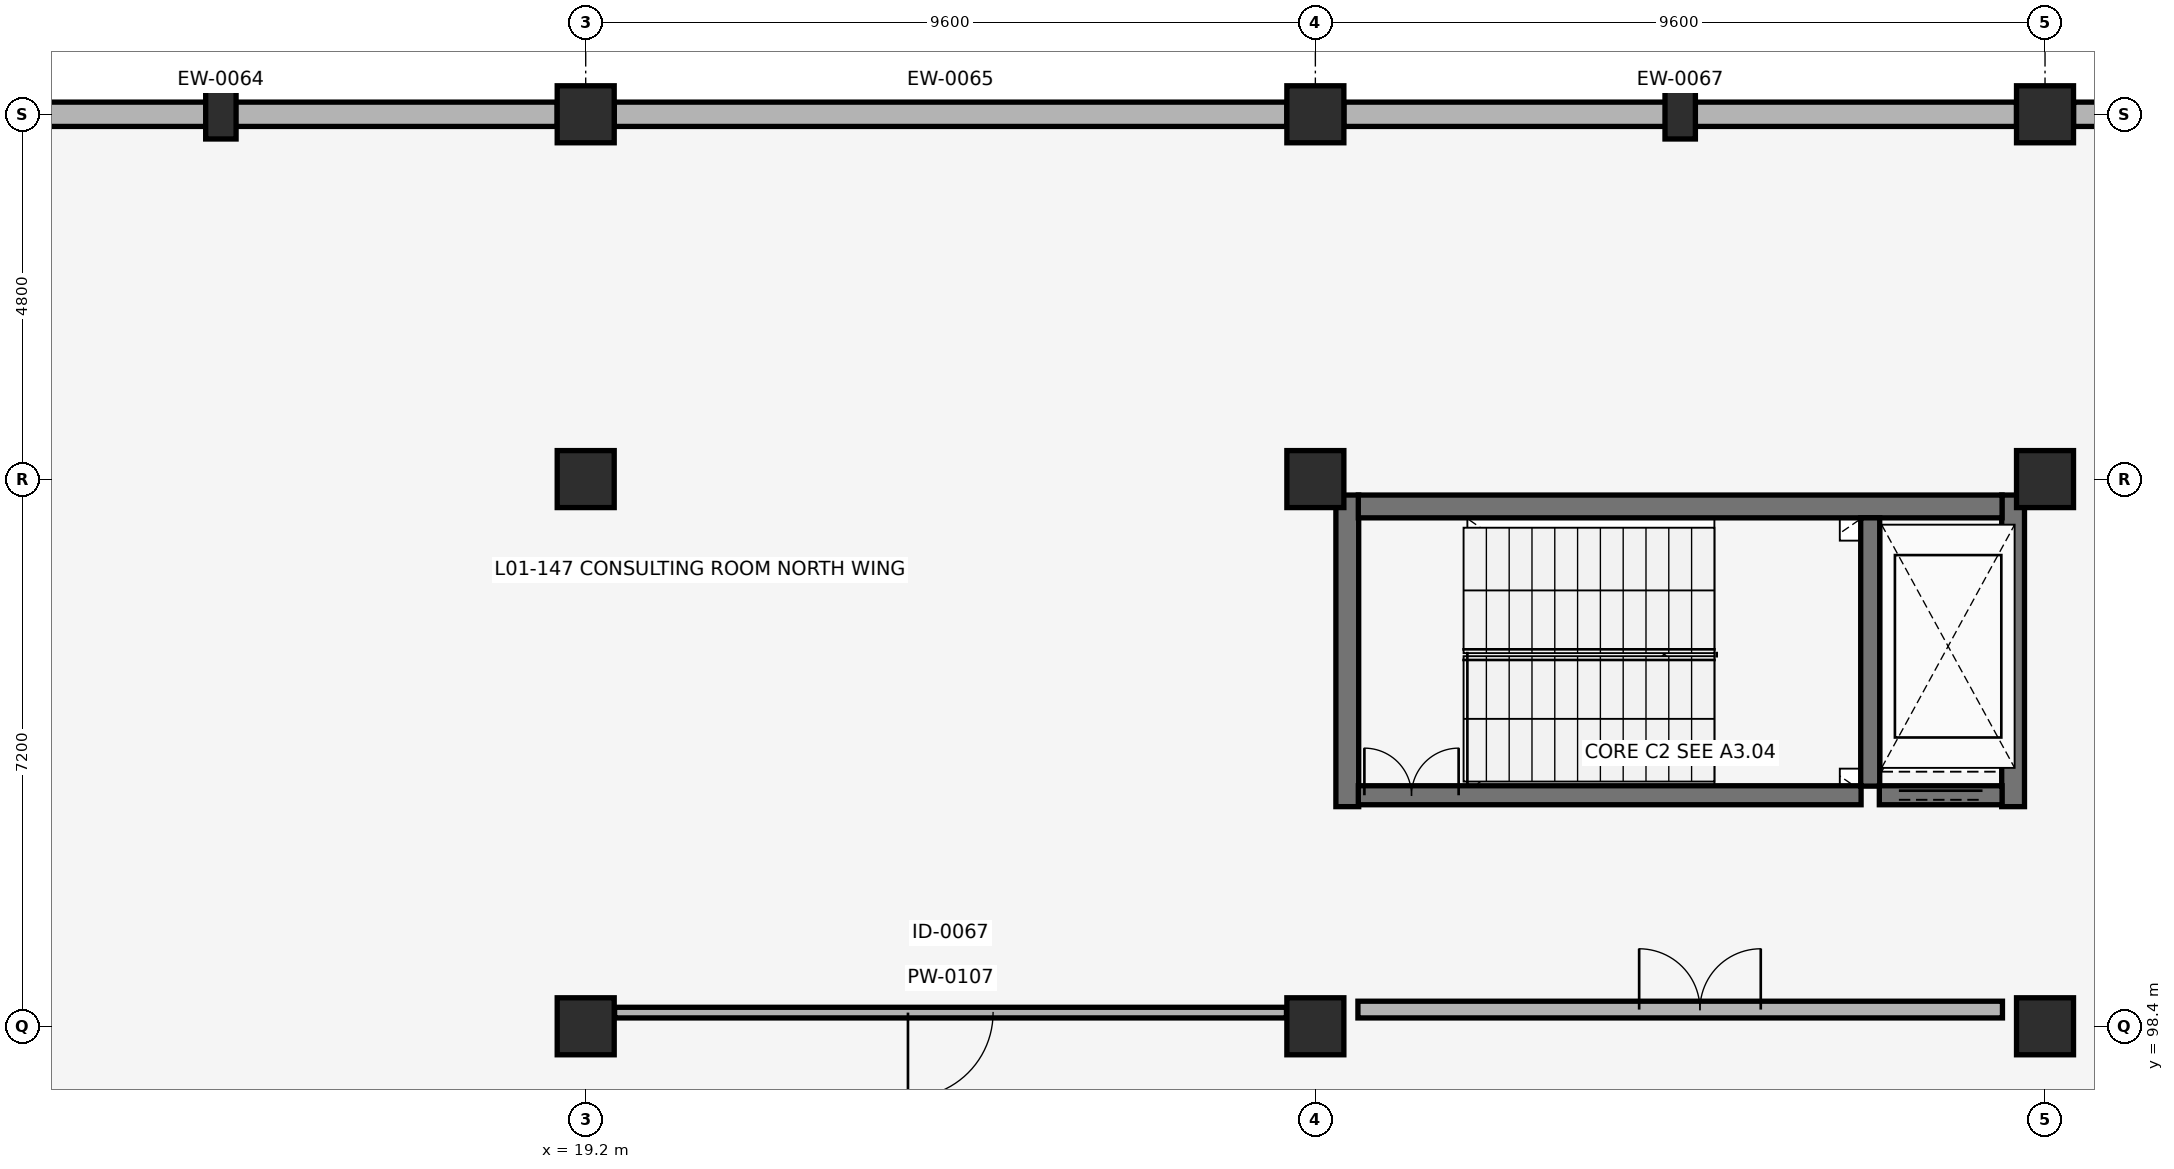
"""IFC4 building model, lengths in metres.
Left out: names, types, materials, properties, quantities, classifications, styles, units other than length and angle.
Written with IfcOpenShell. Run it as: python <this file> out.ifc"""

import sys

from ifc_helpers import new_model, si_unit, direction, frame, frame_2d, origin, origin_2d, place, context, subcontext, project, spatial, rectangle, extrude, element, fill, save


model = new_model("IFC4")
c1 = context("Model", 3, precision=1e-05, world=origin(), true_north=direction((0.0, 1.0)))
c2 = subcontext(c1, "Body", "Model", "MODEL_VIEW")
j1 = project(units=[si_unit("LENGTHUNIT", "METRE"), si_unit("PLANEANGLEUNIT", "RADIAN")], contexts=[c1])
p1 = place(None, origin())
s1 = spatial("IfcSite", under=j1, at=p1, CompositionType="ELEMENT")
p2 = place(p1, origin())
s2 = spatial("IfcBuilding", under=s1, at=p2, CompositionType="ELEMENT")
p3 = place(p2, frame((0.0, 0.0, 4.42)))
s3 = spatial("IfcBuildingStorey", under=s2, at=p3, CompositionType="ELEMENT", Elevation=4.42)
for number, where, z_axis, x_axis in (
    (1, (19.2, 98.4, 0.0), (0.0, 0.0, 1.0), (1.0, 0.0, 0.0)),
    (2, (19.2, 105.6, 0.0), (0.0, 0.0, 1.0), (1.0, 0.0, 0.0)),
    (3, (19.2, 110.4, 0.0), (0.0, 0.0, 1.0), (1.0, 0.0, 0.0)),
    (4, (28.8, 98.4, 0.0), (0.0, 0.0, 1.0), (1.0, 0.0, 0.0)),
    (5, (28.8, 105.6, 0.0), (0.0, 0.0, 1.0), (1.0, 0.0, 0.0)),
    (6, (28.8, 110.4, 0.0), (0.0, 0.0, 1.0), (1.0, 0.0, 0.0)),
    (7, (38.4, 98.4, 0.0), (0.0, 0.0, 1.0), (1.0, 0.0, 0.0)),
    (8, (38.4, 105.6, 0.0), (0.0, 0.0, 1.0), (1.0, 0.0, 0.0)),
    (9, (38.4, 110.4, 0.0), (0.0, 0.0, 1.0), (1.0, 0.0, 0.0)),
):
    element("IfcColumn", number, at=place(p3, frame(where, z_axis=z_axis, x_axis=x_axis)), inside=s3, PredefinedType="COLUMN", context=c2, shape_type="SweptSolid", body=[
        extrude(rectangle(XDim=0.75, YDim=0.75, at=origin_2d()), origin(), (0.0, 0.0, 1.0), 4.08),
    ])
for number, where, z_axis, x_axis in (
    (10, (14.4, 110.4, 0.0), (0.0, 0.0, 1.0), (1.0, 0.0, 0.0)),
    (11, (33.6, 110.4, 0.0), (0.0, 0.0, 1.0), (1.0, 0.0, 0.0)),
):
    element("IfcColumn", number, at=place(p3, frame(where, z_axis=z_axis, x_axis=x_axis)), inside=s3, PredefinedType="PILASTER", context=c2, shape_type="SweptSolid", body=[
        extrude(rectangle(XDim=0.4, YDim=0.65, at=origin_2d()), origin(), (0.0, 0.0, 1.0), 4.08),
    ])
p4 = place(p3, frame((18.825, 110.4, 0.0), z_axis=(0.0, 0.0, 1.0), x_axis=(-1.0, 0.0, 0.0)))
e12 = element("IfcWall", 12, at=p4, inside=s3, PredefinedType="SOLIDWALL", context=c2, shape_type="SweptSolid", body=[
    extrude(rectangle(XDim=8.85, YDim=0.32, at=frame_2d((4.425, 0.0))), origin(), (0.0, 0.0, 1.0), 3.08),
])
p5 = place(p3, frame((28.425, 110.4, 0.0), z_axis=(0.0, 0.0, 1.0), x_axis=(-1.0, 0.0, 0.0)))
e13 = element("IfcWall", 13, at=p5, inside=s3, PredefinedType="SOLIDWALL", context=c2, shape_type="SweptSolid", body=[
    extrude(rectangle(XDim=8.85, YDim=0.32, at=frame_2d((4.425, 0.0))), origin(), (0.0, 0.0, 1.0), 3.08),
])
p6 = place(p3, frame((38.025, 110.4, 0.0), z_axis=(0.0, 0.0, 1.0), x_axis=(-1.0, 0.0, 0.0)))
e14 = element("IfcWall", 14, at=p6, inside=s3, PredefinedType="SOLIDWALL", context=c2, shape_type="SweptSolid", body=[
    extrude(rectangle(XDim=8.85, YDim=0.32, at=frame_2d((4.425, 0.0))), origin(), (0.0, 0.0, 1.0), 3.08),
])
p7 = place(p3, frame((47.625, 110.4, 0.0), z_axis=(0.0, 0.0, 1.0), x_axis=(-1.0, 0.0, 0.0)))
e15 = element("IfcWall", 15, at=p7, inside=s3, PredefinedType="SOLIDWALL", context=c2, shape_type="SweptSolid", body=[
    extrude(rectangle(XDim=8.85, YDim=0.32, at=frame_2d((4.425, 0.0))), origin(), (0.0, 0.0, 1.0), 3.08),
])
for number, where, z_axis, x_axis in (
    (16, (29.22, 101.29, 0.0), (0.0, 0.0, 1.0), (0.0, 1.0, 0.0)),
    (17, (37.98, 101.29, 0.0), (0.0, 0.0, 1.0), (0.0, 1.0, 0.0)),
):
    element("IfcWall", number, at=place(p3, frame(where, z_axis=z_axis, x_axis=x_axis)), inside=s3, PredefinedType="SHEAR", context=c2, shape_type="SweptSolid", body=[
        extrude(rectangle(XDim=4.1, YDim=0.3, at=frame_2d((2.05, 0.0))), origin(), (0.0, 0.0, 1.0), 3.8),
    ])
p8 = place(p3, frame((29.365, 105.24, 0.0), z_axis=(0.0, 0.0, 1.0), x_axis=(1.0, 0.0, 0.0)))
e18 = element("IfcWall", 18, at=p8, inside=s3, PredefinedType="SHEAR", context=c2, shape_type="SweptSolid", body=[
    extrude(rectangle(XDim=8.47, YDim=0.3, at=frame_2d((4.235, 0.0))), origin(), (0.0, 0.0, 1.0), 3.8),
])
p9 = place(p3, frame((36.1, 101.56, 0.0), z_axis=(0.0, 0.0, 1.0), x_axis=(0.0, 1.0, 0.0)))
e19 = element("IfcWall", 19, at=p9, inside=s3, PredefinedType="SHEAR", context=c2, shape_type="SweptSolid", body=[
    extrude(rectangle(XDim=3.53, YDim=0.25, at=frame_2d((1.765, 0.0))), origin(), (0.0, 0.0, 1.0), 3.8),
])
p10 = place(p3, frame((29.365, 101.44, 0.0), z_axis=(0.0, 0.0, 1.0), x_axis=(1.0, 0.0, 0.0)))
e20 = element("IfcWall", 20, at=p10, inside=s3, PredefinedType="SHEAR", context=c2, shape_type="SweptSolid", body=[
    extrude(rectangle(XDim=6.615, YDim=0.25, at=frame_2d((3.308, 0.0))), origin(), (0.0, 0.0, 1.0), 3.8),
])
p11 = place(p10, frame((0.08, 0.0, 0.0)))
e21 = element("IfcOpeningElement", 21, at=p11, cuts=e20, PredefinedType="OPENING", context=c2, shape_type="SweptSolid", body=[
    extrude(rectangle(XDim=1.24, YDim=2.15, at=frame_2d((0.62, 1.075))), frame((0.0, 0.135, 0.0), z_axis=(0.0, -1.0, 0.0), x_axis=(1.0, 0.0, 0.0)), (0.0, 0.0, 1.0), 0.27),
])
p12 = place(p3, frame((29.36, 98.62, 0.0), z_axis=(0.0, 0.0, 1.0), x_axis=(1.0, 0.0, 0.0)))
e22 = element("IfcWall", 22, at=p12, inside=s3, PredefinedType="PARTITIONING", context=c2, shape_type="SweptSolid", body=[
    extrude(rectangle(XDim=8.48, YDim=0.22, at=frame_2d((4.24, 0.0))), origin(), (0.0, 0.0, 1.0), 3.13),
])
p13 = place(p12, frame((3.7, 0.0, 0.0)))
e23 = element("IfcOpeningElement", 23, at=p13, cuts=e22, PredefinedType="OPENING", context=c2, shape_type="SweptSolid", body=[
    extrude(rectangle(XDim=1.6, YDim=2.2, at=frame_2d((0.8, 1.1))), frame((0.0, 0.12, 0.0), z_axis=(0.0, -1.0, 0.0), x_axis=(1.0, 0.0, 0.0)), (0.0, 0.0, 1.0), 0.24),
])
p14 = place(p3, frame((36.22, 101.44, 0.0), z_axis=(0.0, 0.0, 1.0), x_axis=(1.0, 0.0, 0.0)))
e24 = element("IfcWall", 24, at=p14, inside=s3, PredefinedType="SHEAR", context=c2, shape_type="SweptSolid", body=[
    extrude(rectangle(XDim=1.615, YDim=0.25, at=frame_2d((0.808, 0.0))), origin(), (0.0, 0.0, 1.0), 3.8),
])
p15 = place(p14, frame((0.258, 0.0, 0.0)))
e25 = element("IfcOpeningElement", 25, at=p15, cuts=e24, PredefinedType="OPENING", context=c2, shape_type="SweptSolid", body=[
    extrude(rectangle(XDim=1.1, YDim=2.15, at=frame_2d((0.55, 1.075))), frame((0.0, 0.135, 0.0), z_axis=(0.0, -1.0, 0.0), x_axis=(1.0, 0.0, 0.0)), (0.0, 0.0, 1.0), 0.27),
])
p16 = place(p3, frame((19.58, 98.58, 0.0), z_axis=(0.0, 0.0, 1.0), x_axis=(1.0, 0.0, 0.0)))
e26 = element("IfcWall", 26, at=p16, inside=s3, PredefinedType="PARTITIONING", context=c2, shape_type="SweptSolid", body=[
    extrude(rectangle(XDim=8.84, YDim=0.14, at=frame_2d((4.42, 0.0))), origin(), (0.0, 0.0, 1.0), 3.12),
])
p17 = place(p16, frame((3.86, 0.0, 0.0)))
e27 = element("IfcOpeningElement", 27, at=p17, cuts=e26, PredefinedType="OPENING", context=c2, shape_type="SweptSolid", body=[
    extrude(rectangle(XDim=1.12, YDim=2.1, at=frame_2d((0.56, 1.05))), frame((0.0, 0.08, 0.0), z_axis=(0.0, -1.0, 0.0), x_axis=(1.0, 0.0, 0.0)), (0.0, 0.0, 1.0), 0.16),
])
p18 = place(p11, origin())
e28 = element("IfcDoor", 28, at=p18, inside=s3, OperationType="DOUBLE_DOOR_SINGLE_SWING", PredefinedType="DOOR", context=c2, shape_type="SweptSolid", body=[
    extrude(rectangle(XDim=1.24, YDim=2.15, at=frame_2d((0.62, 1.075))), frame((0.0, 0.025, 0.0), z_axis=(0.0, -1.0, 0.0), x_axis=(1.0, 0.0, 0.0)), (0.0, 0.0, 1.0), 0.05),
])
fill(e21, e28)
p19 = place(p13, origin())
e29 = element("IfcDoor", 29, at=p19, inside=s3, OperationType="DOUBLE_DOOR_SINGLE_SWING", PredefinedType="DOOR", context=c2, shape_type="SweptSolid", body=[
    extrude(rectangle(XDim=1.6, YDim=2.2, at=frame_2d((0.8, 1.1))), frame((0.0, 0.025, 0.0), z_axis=(0.0, -1.0, 0.0), x_axis=(1.0, 0.0, 0.0)), (0.0, 0.0, 1.0), 0.05),
])
fill(e23, e29)
p20 = place(p15, origin())
e30 = element("IfcDoor", 30, at=p20, inside=s3, OperationType="DOUBLE_DOOR_SLIDING", PredefinedType="DOOR", context=c2, shape_type="SweptSolid", body=[
    extrude(rectangle(XDim=1.1, YDim=2.15, at=frame_2d((0.55, 1.075))), frame((0.0, 0.025, 0.0), z_axis=(0.0, -1.0, 0.0), x_axis=(1.0, 0.0, 0.0)), (0.0, 0.0, 1.0), 0.05),
])
fill(e25, e30)
p21 = place(p17, origin())
e31 = element("IfcDoor", 31, at=p21, inside=s3, OperationType="SINGLE_SWING_RIGHT", PredefinedType="DOOR", context=c2, shape_type="SweptSolid", body=[
    extrude(rectangle(XDim=1.12, YDim=2.1, at=frame_2d((0.56, 1.05))), frame((0.0, 0.025, 0.0), z_axis=(0.0, -1.0, 0.0), x_axis=(1.0, 0.0, 0.0)), (0.0, 0.0, 1.0), 0.05),
])
fill(e27, e31)
save(model, sys.argv[1])
